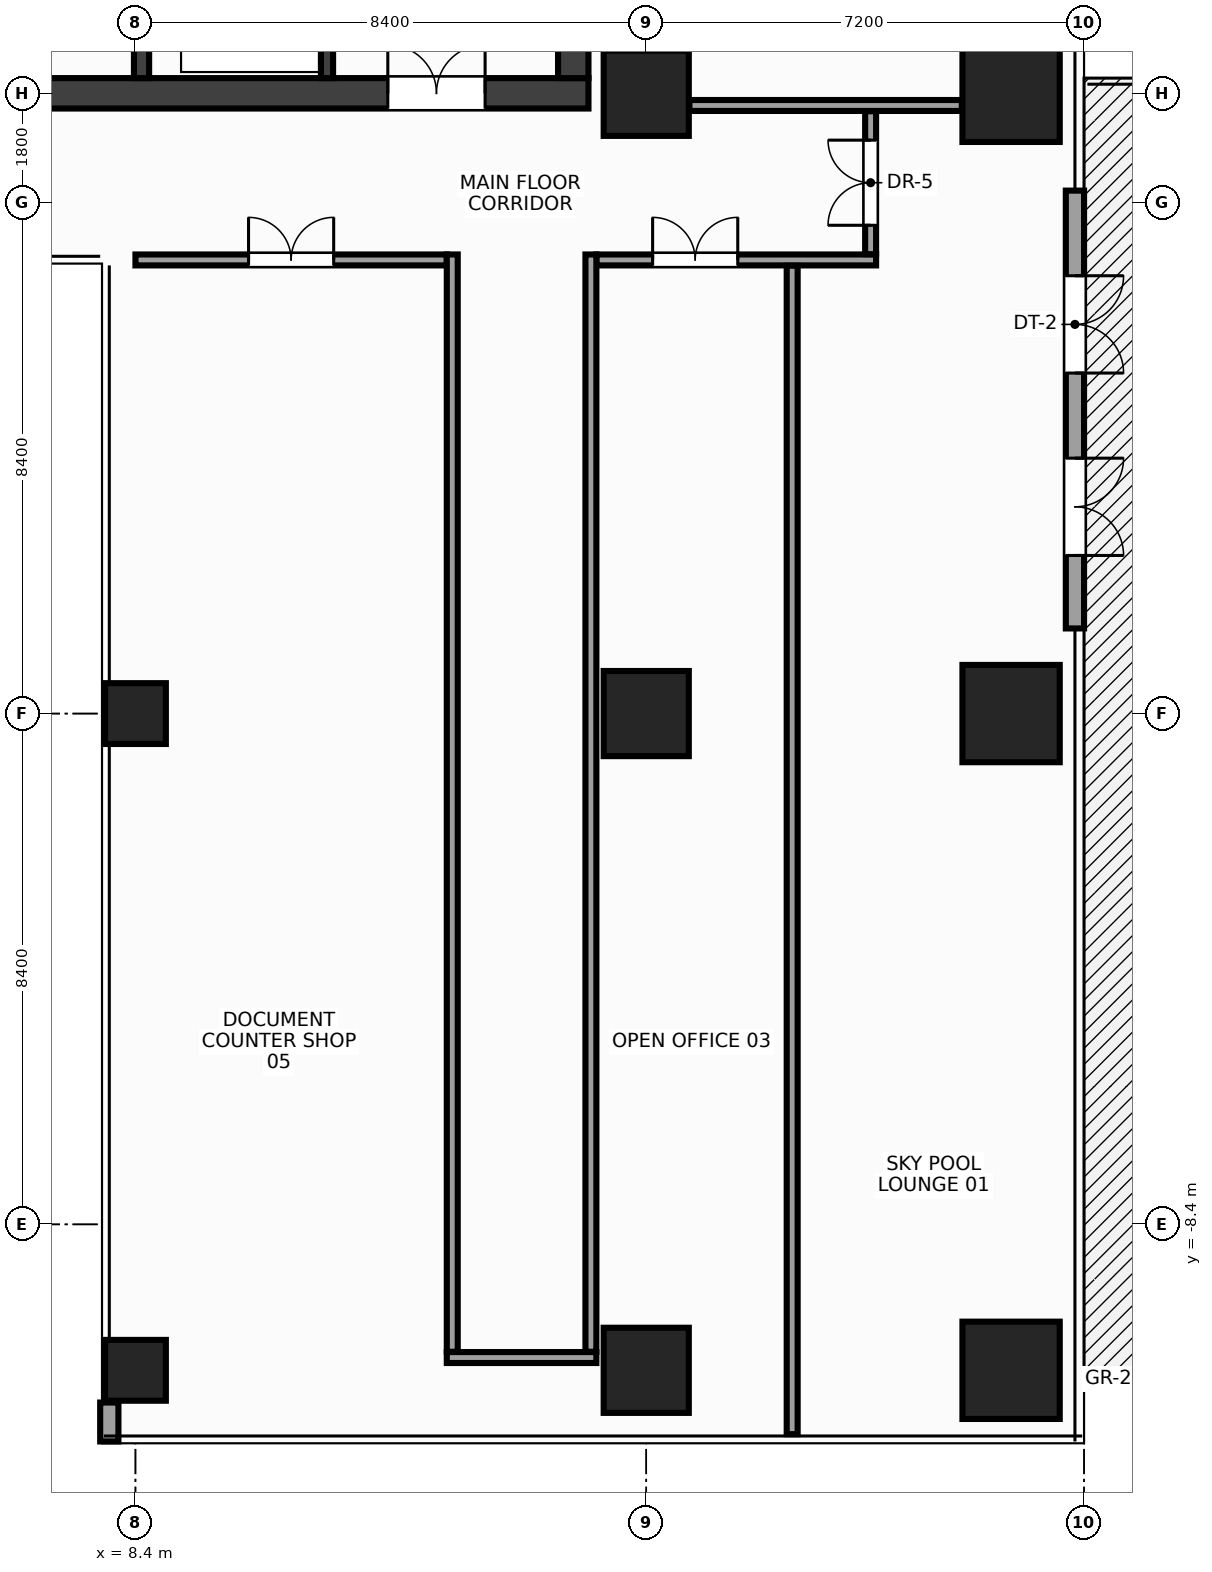
"""IFC4 building model, lengths in metres.
Left out: names, types, materials, properties, quantities, classifications, styles, units other than length and angle.
Written with IfcOpenShell. Run it as: python <this file> out.ifc"""

import sys

from ifc_helpers import new_model, si_unit, direction, frame, frame_2d, origin, origin_2d, place, context, subcontext, project, spatial, rectangle, hollow_rectangle, extrude, source, transform, mapped, element, fill, save


model = new_model("IFC4")
c1 = context("Model", 3, precision=1e-05, world=origin(), true_north=direction((0.0, 1.0)))
c2 = subcontext(c1, "Body", "Model", "MODEL_VIEW")
j1 = project(units=[si_unit("LENGTHUNIT", "METRE"), si_unit("PLANEANGLEUNIT", "RADIAN")], contexts=[c1])
p1 = place(None, origin())
s1 = spatial("IfcSite", under=j1, at=p1, CompositionType="ELEMENT")
p2 = place(p1, origin())
s2 = spatial("IfcBuilding", under=s1, at=p2, CompositionType="ELEMENT")
p3 = place(p2, frame((0.0, 0.0, 225.2)))
s3 = spatial("IfcBuildingStorey", under=s2, at=p3, CompositionType="ELEMENT", Elevation=225.2)
m1 = source(origin(), c2, "Body", "SweptSolid", [
    extrude(rectangle(XDim=31.7, YDim=0.5, at=frame_2d((15.85, 0.0))), origin(), (0.0, 0.0, 1.0), 3.6),
])
p4 = place(p3, frame((-15.85, 10.2, 0.0), z_axis=(0.0, 0.0, 1.0), x_axis=(1.0, 0.0, 0.0)))
e1 = element("IfcWall", 1, at=p4, inside=s3, PredefinedType="SHEAR", context=c2, shape_type="MappedRepresentation", body=[
    mapped(m1, transform((0.0, 0.0, 0.0), x_axis=(1.0, 0.0, 0.0), y_axis=(0.0, 1.0, 0.0), z_axis=(0.0, 0.0, 1.0), scale=1.0)),
])
p5 = place(p4, frame((1.7, 0.0, 0.0)))
e2 = element("IfcOpeningElement", 2, at=p5, cuts=e1, PredefinedType="OPENING", context=c2, shape_type="SweptSolid", body=[
    extrude(rectangle(XDim=1.6, YDim=2.15, at=frame_2d((0.8, 1.075))), frame((0.0, 0.262, 0.0), z_axis=(0.0, -1.0, 0.0), x_axis=(1.0, 0.0, 0.0)), (0.0, 0.0, 1.0), 0.524),
])
p6 = place(p4, frame((28.4, 0.0, 0.0)))
e3 = element("IfcOpeningElement", 3, at=p6, cuts=e1, PredefinedType="OPENING", context=c2, shape_type="SweptSolid", body=[
    extrude(rectangle(XDim=1.6, YDim=2.15, at=frame_2d((0.8, 1.075))), frame((0.0, 0.262, 0.0), z_axis=(0.0, -1.0, 0.0), x_axis=(1.0, 0.0, 0.0)), (0.0, 0.0, 1.0), 0.524),
])
p7 = place(p4, frame((15.1, 0.0, 0.0)))
e4 = element("IfcOpeningElement", 4, at=p7, cuts=e1, PredefinedType="OPENING", context=c2, shape_type="SweptSolid", body=[
    extrude(rectangle(XDim=1.5, YDim=2.2, at=frame_2d((0.75, 1.1))), frame((0.0, 0.262, 0.0), z_axis=(0.0, -1.0, 0.0), x_axis=(1.0, 0.0, 0.0)), (0.0, 0.0, 1.0), 0.524),
])
m2 = source(origin(), c2, "Body", "SweptSolid", [
    extrude(rectangle(XDim=13.1, YDim=0.5, at=frame_2d((6.55, 0.0))), origin(), (0.0, 0.0, 1.0), 3.6),
])
p8 = place(p3, frame((15.6, 10.45, 0.0), z_axis=(0.0, 0.0, 1.0), x_axis=(0.0, 1.0, 0.0)))
e5 = element("IfcWall", 5, at=p8, inside=s3, PredefinedType="SHEAR", context=c2, shape_type="MappedRepresentation", body=[
    mapped(m2, transform((0.0, 0.0, 0.0), x_axis=(1.0, 0.0, 0.0), y_axis=(0.0, 1.0, 0.0), z_axis=(0.0, 0.0, 1.0), scale=1.0)),
])
m3 = source(origin(), c2, "Body", "SweptSolid", [
    extrude(rectangle(XDim=13.1, YDim=0.25, at=frame_2d((6.55, 0.0))), origin(), (0.0, 0.0, 1.0), 3.6),
])
p9 = place(p3, frame((8.5, 10.45, 0.0), z_axis=(0.0, 0.0, 1.0), x_axis=(0.0, 1.0, 0.0)))
e6 = element("IfcWall", 6, at=p9, inside=s3, PredefinedType="SHEAR", context=c2, shape_type="MappedRepresentation", body=[
    mapped(m3, transform((0.0, 0.0, 0.0), x_axis=(1.0, 0.0, 0.0), y_axis=(0.0, 1.0, 0.0), z_axis=(0.0, 0.0, 1.0), scale=1.0)),
])
p10 = place(p9, frame((10.0, 0.0, 0.0)))
e7 = element("IfcOpeningElement", 7, at=p10, cuts=e6, PredefinedType="OPENING", context=c2, shape_type="SweptSolid", body=[
    extrude(rectangle(XDim=0.95, YDim=2.15, at=frame_2d((0.475, 1.075))), frame((0.0, 0.137, 0.0), z_axis=(0.0, -1.0, 0.0), x_axis=(1.0, 0.0, 0.0)), (0.0, 0.0, 1.0), 0.274),
])
m4 = source(origin(), c2, "Body", "SweptSolid", [
    extrude(rectangle(XDim=3.2, YDim=0.2, at=frame_2d((1.6, 0.0))), origin(), (0.0, 0.0, 1.0), 3.6),
])
p11 = place(p3, frame((11.55, 10.45, 0.0), z_axis=(0.0, 0.0, 1.0), x_axis=(0.0, 1.0, 0.0)))
e8 = element("IfcWall", 8, at=p11, inside=s3, PredefinedType="SHEAR", context=c2, shape_type="MappedRepresentation", body=[
    mapped(m4, transform((0.0, 0.0, 0.0), x_axis=(1.0, 0.0, 0.0), y_axis=(0.0, 1.0, 0.0), z_axis=(0.0, 0.0, 1.0), scale=1.0)),
])
p12 = place(p11, frame((0.9, 0.0, 0.0)))
e9 = element("IfcOpeningElement", 9, at=p12, cuts=e8, PredefinedType="OPENING", context=c2, shape_type="SweptSolid", body=[
    extrude(rectangle(XDim=1.1, YDim=2.15, at=frame_2d((0.55, 1.075))), frame((0.0, 0.112, 0.0), z_axis=(0.0, -1.0, 0.0), x_axis=(1.0, 0.0, 0.0)), (0.0, 0.0, 1.0), 0.224),
])
m5 = source(origin(), c2, "Body", "SweptSolid", [
    extrude(rectangle(XDim=1.4, YDim=1.4, at=origin_2d()), origin(), (0.0, 0.0, 1.0), 3.6),
])
for number, where, z_axis, x_axis in (
    (10, (16.8, -10.8, 0.0), (0.0, 0.0, 1.0), (1.0, 0.0, 0.0)),
    (11, (16.8, 0.0, 0.0), (0.0, 0.0, 1.0), (1.0, 0.0, 0.0)),
    (12, (16.8, 10.2, 0.0), (0.0, 0.0, 1.0), (1.0, 0.0, 0.0)),
):
    element("IfcColumn", number, at=place(p3, frame(where, z_axis=z_axis, x_axis=x_axis)), inside=s3, PredefinedType="COLUMN", context=c2, shape_type="MappedRepresentation", body=[
        mapped(m5, transform((0.0, 0.0, 0.0), x_axis=(1.0, 0.0, 0.0), y_axis=(0.0, 1.0, 0.0), z_axis=(0.0, 0.0, 1.0), scale=1.0)),
    ])
m6 = source(origin(), c2, "Body", "SweptSolid", [
    extrude(rectangle(XDim=1.6, YDim=1.6, at=origin_2d()), origin(), (0.0, 0.0, 1.0), 3.6),
])
for number, where, z_axis, x_axis in (
    (13, (22.8, -10.8, 0.0), (0.0, 0.0, 1.0), (1.0, 0.0, 0.0)),
    (14, (22.8, 0.0, 0.0), (0.0, 0.0, 1.0), (1.0, 0.0, 0.0)),
    (15, (22.8, 10.2, 0.0), (0.0, 0.0, 1.0), (1.0, 0.0, 0.0)),
):
    element("IfcColumn", number, at=place(p3, frame(where, z_axis=z_axis, x_axis=x_axis)), inside=s3, PredefinedType="COLUMN", context=c2, shape_type="MappedRepresentation", body=[
        mapped(m6, transform((0.0, 0.0, 0.0), x_axis=(1.0, 0.0, 0.0), y_axis=(0.0, 1.0, 0.0), z_axis=(0.0, 0.0, 1.0), scale=1.0)),
    ])
m7 = source(origin(), c2, "Body", "SweptSolid", [
    extrude(hollow_rectangle(XDim=1.0, YDim=1.0, WallThickness=0.045, at=origin_2d()), origin(), (0.0, 0.0, 1.0), 3.6),
])
for number, where, z_axis, x_axis in (
    (16, (8.4, 0.0, 0.0), (0.0, 0.0, 1.0), (1.0, 0.0, 0.0)),
    (17, (8.4, -10.8, 0.0), (0.0, 0.0, 1.0), (1.0, 0.0, 0.0)),
):
    element("IfcColumn", number, at=place(p3, frame(where, z_axis=z_axis, x_axis=x_axis)), inside=s3, PredefinedType="COLUMN", context=c2, shape_type="MappedRepresentation", body=[
        mapped(m7, transform((0.0, 0.0, 0.0), x_axis=(1.0, 0.0, 0.0), y_axis=(0.0, 1.0, 0.0), z_axis=(0.0, 0.0, 1.0), scale=1.0)),
    ])
m8 = source(origin(), c2, "Body", "SweptSolid", [
    extrude(rectangle(XDim=0.64, YDim=0.24, at=frame_2d((0.32, 0.0))), origin(), (0.0, 0.0, 1.0), 2.66),
])
p13 = place(p3, frame((7.97, -11.33, 0.0), z_axis=(0.0, 0.0, 1.0), x_axis=(0.0, -1.0, 0.0)))
e18 = element("IfcWall", 18, at=p13, inside=s3, PredefinedType="STANDARD", context=c2, shape_type="MappedRepresentation", body=[
    mapped(m8, transform((0.0, 0.0, 0.0), x_axis=(1.0, 0.0, 0.0), y_axis=(0.0, 1.0, 0.0), z_axis=(0.0, 0.0, 1.0), scale=1.0)),
])
m9 = source(origin(), c2, "Body", "SweptSolid", [
    extrude(rectangle(XDim=7.2, YDim=0.3, at=frame_2d((3.6, 0.0))), origin(), (0.0, 0.0, 1.0), 2.66),
])
p14 = place(p3, frame((23.85, 8.6, 0.0), z_axis=(0.0, 0.0, 1.0), x_axis=(0.0, -1.0, 0.0)))
e19 = element("IfcWall", 19, at=p14, inside=s3, PredefinedType="STANDARD", context=c2, shape_type="MappedRepresentation", body=[
    mapped(m9, transform((0.0, 0.0, 0.0), x_axis=(1.0, 0.0, 0.0), y_axis=(0.0, 1.0, 0.0), z_axis=(0.0, 0.0, 1.0), scale=1.0)),
])
p15 = place(p14, frame((1.4, 0.0, 0.0)))
e20 = element("IfcOpeningElement", 20, at=p15, cuts=e19, PredefinedType="OPENING", context=c2, shape_type="SweptSolid", body=[
    extrude(rectangle(XDim=1.6, YDim=2.2, at=frame_2d((0.8, 1.1))), frame((0.0, 0.162, 0.0), z_axis=(0.0, -1.0, 0.0), x_axis=(1.0, 0.0, 0.0)), (0.0, 0.0, 1.0), 0.324),
])
p16 = place(p14, frame((4.4, 0.0, 0.0)))
e21 = element("IfcOpeningElement", 21, at=p16, cuts=e19, PredefinedType="OPENING", context=c2, shape_type="SweptSolid", body=[
    extrude(rectangle(XDim=1.6, YDim=2.2, at=frame_2d((0.8, 1.1))), frame((0.0, 0.162, 0.0), z_axis=(0.0, -1.0, 0.0), x_axis=(1.0, 0.0, 0.0)), (0.0, 0.0, 1.0), 0.324),
])
m10 = source(origin(), c2, "Body", "SweptSolid", [
    extrude(rectangle(XDim=4.48, YDim=0.18, at=frame_2d((2.24, 0.0))), origin(), (0.0, 0.0, 1.0), 2.815),
])
p17 = place(p3, frame((17.51, 10.0, 0.0), z_axis=(0.0, 0.0, 1.0), x_axis=(1.0, 0.0, 0.0)))
e22 = element("IfcWall", 22, at=p17, inside=s3, PredefinedType="PARTITIONING", context=c2, shape_type="MappedRepresentation", body=[
    mapped(m10, transform((0.0, 0.0, 0.0), x_axis=(1.0, 0.0, 0.0), y_axis=(0.0, 1.0, 0.0), z_axis=(0.0, 0.0, 1.0), scale=1.0)),
])
m11 = source(origin(), c2, "Body", "SweptSolid", [
    extrude(rectangle(XDim=5.12, YDim=0.18, at=frame_2d((2.56, 0.0))), origin(), (0.0, 0.0, 1.0), 3.28),
])
p18 = place(p3, frame((8.4, 7.46, 0.0), z_axis=(0.0, 0.0, 1.0), x_axis=(1.0, 0.0, 0.0)))
e23 = element("IfcWall", 23, at=p18, inside=s3, PredefinedType="PARTITIONING", context=c2, shape_type="MappedRepresentation", body=[
    mapped(m11, transform((0.0, 0.0, 0.0), x_axis=(1.0, 0.0, 0.0), y_axis=(0.0, 1.0, 0.0), z_axis=(0.0, 0.0, 1.0), scale=1.0)),
])
p19 = place(p18, frame((1.86, 0.0, 0.0)))
e24 = element("IfcOpeningElement", 24, at=p19, cuts=e23, PredefinedType="OPENING", context=c2, shape_type="SweptSolid", body=[
    extrude(rectangle(XDim=1.4, YDim=2.2, at=frame_2d((0.7, 1.1))), frame((0.0, 0.102, 0.0), z_axis=(0.0, -1.0, 0.0), x_axis=(1.0, 0.0, 0.0)), (0.0, 0.0, 1.0), 0.204),
])
m12 = source(origin(), c2, "Body", "SweptSolid", [
    extrude(rectangle(XDim=4.6, YDim=0.18, at=frame_2d((2.3, 0.0))), origin(), (0.0, 0.0, 1.0), 2.665),
])
p20 = place(p3, frame((15.98, 7.46, 0.0), z_axis=(0.0, 0.0, 1.0), x_axis=(1.0, 0.0, 0.0)))
e25 = element("IfcWall", 25, at=p20, inside=s3, PredefinedType="PARTITIONING", context=c2, shape_type="MappedRepresentation", body=[
    mapped(m12, transform((0.0, 0.0, 0.0), x_axis=(1.0, 0.0, 0.0), y_axis=(0.0, 1.0, 0.0), z_axis=(0.0, 0.0, 1.0), scale=1.0)),
])
p21 = place(p20, frame((0.925, 0.0, 0.0)))
e26 = element("IfcOpeningElement", 26, at=p21, cuts=e25, PredefinedType="OPENING", context=c2, shape_type="SweptSolid", body=[
    extrude(rectangle(XDim=1.4, YDim=2.2, at=frame_2d((0.7, 1.1))), frame((0.0, 0.102, 0.0), z_axis=(0.0, -1.0, 0.0), x_axis=(1.0, 0.0, 0.0)), (0.0, 0.0, 1.0), 0.204),
])
m13 = source(origin(), c2, "Body", "SweptSolid", [
    extrude(rectangle(XDim=2.46, YDim=0.18, at=frame_2d((1.23, 0.0))), origin(), (0.0, 0.0, 1.0), 2.815),
])
p22 = place(p3, frame((13.52, -10.59, 0.0), z_axis=(0.0, 0.0, 1.0), x_axis=(1.0, 0.0, 0.0)))
e27 = element("IfcWall", 27, at=p22, inside=s3, PredefinedType="PARTITIONING", context=c2, shape_type="MappedRepresentation", body=[
    mapped(m13, transform((0.0, 0.0, 0.0), x_axis=(1.0, 0.0, 0.0), y_axis=(0.0, 1.0, 0.0), z_axis=(0.0, 0.0, 1.0), scale=1.0)),
])
m14 = source(origin(), c2, "Body", "SweptSolid", [
    extrude(rectangle(XDim=2.35, YDim=0.18, at=frame_2d((1.175, 0.0))), origin(), (0.0, 0.0, 1.0), 3.28),
])
p23 = place(p3, frame((20.49, 7.555, 0.0), z_axis=(0.0, 0.0, 1.0), x_axis=(0.0, 1.0, 0.0)))
e28 = element("IfcWall", 28, at=p23, inside=s3, PredefinedType="PARTITIONING", context=c2, shape_type="MappedRepresentation", body=[
    mapped(m14, transform((0.0, 0.0, 0.0), x_axis=(1.0, 0.0, 0.0), y_axis=(0.0, 1.0, 0.0), z_axis=(0.0, 0.0, 1.0), scale=1.0)),
])
p24 = place(p23, frame((0.475, 0.0, 0.0)))
e29 = element("IfcOpeningElement", 29, at=p24, cuts=e28, PredefinedType="OPENING", context=c2, shape_type="SweptSolid", body=[
    extrude(rectangle(XDim=1.4, YDim=2.2, at=frame_2d((0.7, 1.1))), frame((0.0, 0.102, 0.0), z_axis=(0.0, -1.0, 0.0), x_axis=(1.0, 0.0, 0.0)), (0.0, 0.0, 1.0), 0.204),
])
m15 = source(origin(), c2, "Body", "SweptSolid", [
    extrude(rectangle(XDim=18.045, YDim=0.18, at=frame_2d((9.022, 0.0))), origin(), (0.0, 0.0, 1.0), 2.815),
])
for number, where, z_axis, x_axis in (
    (30, (13.61, -10.495, 0.0), (0.0, 0.0, 1.0), (0.0, 1.0, 0.0)),
    (31, (15.89, -10.495, 0.0), (0.0, 0.0, 1.0), (0.0, 1.0, 0.0)),
):
    element("IfcWall", number, at=place(p3, frame(where, z_axis=z_axis, x_axis=x_axis)), inside=s3, PredefinedType="PARTITIONING", context=c2, shape_type="MappedRepresentation", body=[
        mapped(m15, transform((0.0, 0.0, 0.0), x_axis=(1.0, 0.0, 0.0), y_axis=(0.0, 1.0, 0.0), z_axis=(0.0, 0.0, 1.0), scale=1.0)),
    ])
m16 = source(origin(), c2, "Body", "SweptSolid", [
    extrude(rectangle(XDim=19.215, YDim=0.18, at=frame_2d((9.607, 0.0))), origin(), (0.0, 0.0, 1.0), 2.815),
])
p25 = place(p3, frame((19.2, -11.85, 0.0), z_axis=(0.0, 0.0, 1.0), x_axis=(0.0, 1.0, 0.0)))
e32 = element("IfcWall", 32, at=p25, inside=s3, PredefinedType="PARTITIONING", context=c2, shape_type="MappedRepresentation", body=[
    mapped(m16, transform((0.0, 0.0, 0.0), x_axis=(1.0, 0.0, 0.0), y_axis=(0.0, 1.0, 0.0), z_axis=(0.0, 0.0, 1.0), scale=1.0)),
])
m17 = source(origin(), c2, "Body", "SweptSolid", [
    extrude(rectangle(XDim=1.6, YDim=2.2, at=frame_2d((0.8, 1.1))), frame((0.0, 0.025, 0.0), z_axis=(0.0, -1.0, 0.0), x_axis=(1.0, 0.0, 0.0)), (0.0, 0.0, 1.0), 0.05),
])
p26 = place(p15, origin())
e33 = element("IfcDoor", 33, at=p26, inside=s3, OperationType="DOUBLE_DOOR_SINGLE_SWING", PredefinedType="DOOR", context=c2, shape_type="MappedRepresentation", body=[
    mapped(m17, transform((0.0, 0.0, 0.0), x_axis=(1.0, 0.0, 0.0), y_axis=(0.0, 1.0, 0.0), z_axis=(0.0, 0.0, 1.0), scale=1.0)),
])
fill(e20, e33)
p27 = place(p16, origin())
e34 = element("IfcDoor", 34, at=p27, inside=s3, OperationType="DOUBLE_DOOR_SINGLE_SWING", PredefinedType="DOOR", context=c2, shape_type="MappedRepresentation", body=[
    mapped(m17, transform((0.0, 0.0, 0.0), x_axis=(1.0, 0.0, 0.0), y_axis=(0.0, 1.0, 0.0), z_axis=(0.0, 0.0, 1.0), scale=1.0)),
])
fill(e21, e34)
m18 = source(origin(), c2, "Body", "SweptSolid", [
    extrude(rectangle(XDim=1.6, YDim=2.15, at=frame_2d((0.8, 1.075))), frame((0.0, 0.025, 0.0), z_axis=(0.0, -1.0, 0.0), x_axis=(1.0, 0.0, 0.0)), (0.0, 0.0, 1.0), 0.05),
])
p28 = place(p6, origin())
e35 = element("IfcDoor", 35, at=p28, inside=s3, OperationType="DOUBLE_DOOR_SINGLE_SWING", PredefinedType="DOOR", context=c2, shape_type="MappedRepresentation", body=[
    mapped(m18, transform((0.0, 0.0, 0.0), x_axis=(1.0, 0.0, 0.0), y_axis=(0.0, 1.0, 0.0), z_axis=(0.0, 0.0, 1.0), scale=1.0)),
])
fill(e3, e35)
m19 = source(origin(), c2, "Body", "SweptSolid", [
    extrude(rectangle(XDim=1.4, YDim=2.2, at=frame_2d((0.7, 1.1))), frame((0.0, 0.025, 0.0), z_axis=(0.0, -1.0, 0.0), x_axis=(1.0, 0.0, 0.0)), (0.0, 0.0, 1.0), 0.05),
])
p29 = place(p24, origin())
e36 = element("IfcDoor", 36, at=p29, inside=s3, OperationType="DOUBLE_DOOR_SINGLE_SWING", PredefinedType="DOOR", context=c2, shape_type="MappedRepresentation", body=[
    mapped(m19, transform((0.0, 0.0, 0.0), x_axis=(1.0, 0.0, 0.0), y_axis=(0.0, 1.0, 0.0), z_axis=(0.0, 0.0, 1.0), scale=1.0)),
])
fill(e29, e36)
p30 = place(p21, origin())
e37 = element("IfcDoor", 37, at=p30, inside=s3, OperationType="DOUBLE_DOOR_SINGLE_SWING", PredefinedType="DOOR", context=c2, shape_type="MappedRepresentation", body=[
    mapped(m19, transform((0.0, 0.0, 0.0), x_axis=(1.0, 0.0, 0.0), y_axis=(0.0, 1.0, 0.0), z_axis=(0.0, 0.0, 1.0), scale=1.0)),
])
fill(e26, e37)
p31 = place(p19, origin())
e38 = element("IfcDoor", 38, at=p31, inside=s3, OperationType="DOUBLE_DOOR_SINGLE_SWING", PredefinedType="DOOR", context=c2, shape_type="MappedRepresentation", body=[
    mapped(m19, transform((0.0, 0.0, 0.0), x_axis=(1.0, 0.0, 0.0), y_axis=(0.0, 1.0, 0.0), z_axis=(0.0, 0.0, 1.0), scale=1.0)),
])
fill(e24, e38)
save(model, sys.argv[1])
